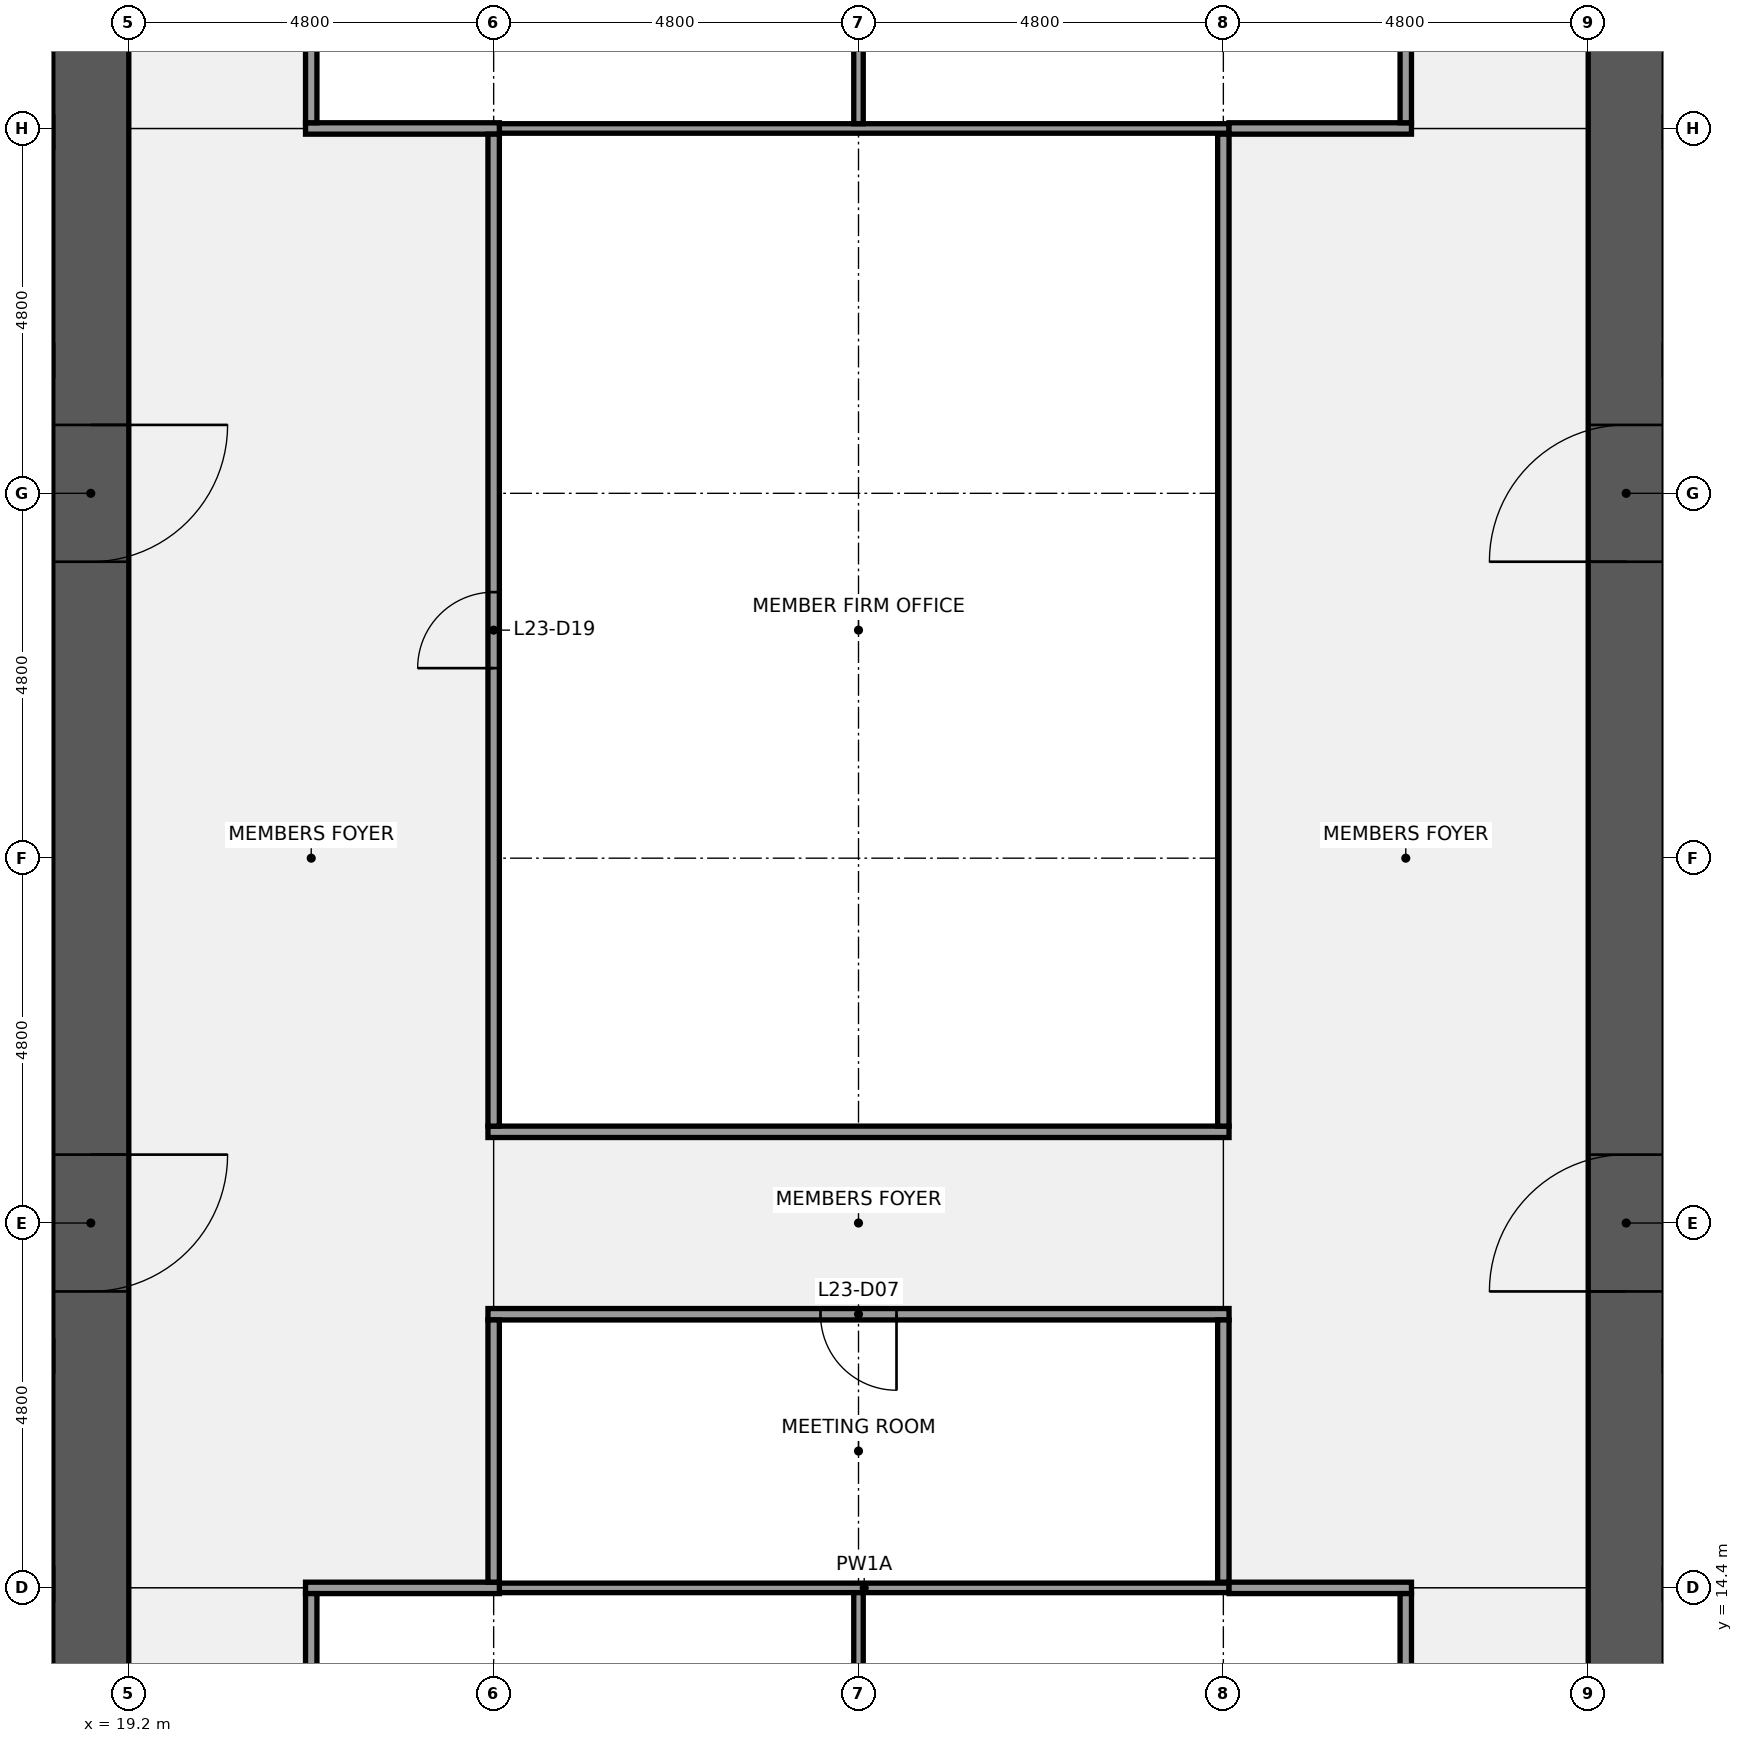
"""IFC4 building model, lengths in metres.
Left out: names, types, materials, properties, quantities, classifications, styles, units other than length and angle.
Written with IfcOpenShell. Run it as: python <this file> out.ifc"""

import sys

from ifc_helpers import new_model, si_unit, direction, frame, frame_2d, origin, place, context, subcontext, project, spatial, rectangle, extrude, element, fill, save


model = new_model("IFC4")
c1 = context("Model", 3, precision=1e-05, world=origin(), true_north=direction((0.0, 1.0)))
c2 = subcontext(c1, "Body", "Model", "MODEL_VIEW")
j1 = project(units=[si_unit("LENGTHUNIT", "METRE"), si_unit("PLANEANGLEUNIT", "RADIAN")], contexts=[c1])
p1 = place(None, origin())
s1 = spatial("IfcSite", under=j1, at=p1, CompositionType="ELEMENT")
p2 = place(p1, origin())
s2 = spatial("IfcBuilding", under=s1, at=p2, CompositionType="ELEMENT")
p3 = place(p2, frame((0.0, 0.0, 112.1)))
s3 = spatial("IfcBuildingStorey", under=s2, at=p3, CompositionType="ELEMENT", Elevation=112.1)
p4 = place(p3, frame((18.7, 38.4, 0.0), z_axis=(0.0, 0.0, 1.0), x_axis=(0.0, -1.0, 0.0)))
e1 = element("IfcWall", 1, at=p4, inside=s3, PredefinedType="SHEAR", context=c2, shape_type="SweptSolid", body=[
    extrude(rectangle(XDim=28.8, YDim=1.0, at=frame_2d((14.4, 0.0))), origin(), (0.0, 0.0, 1.0), 3.84),
])
p5 = place(p4, frame((18.3, 0.0, 0.0)))
e2 = element("IfcOpeningElement", 2, at=p5, cuts=e1, PredefinedType="OPENING", context=c2, shape_type="SweptSolid", body=[
    extrude(rectangle(XDim=1.8, YDim=2.1, at=frame_2d((0.9, 1.05))), frame((0.0, 0.51, 0.0), z_axis=(0.0, -1.0, 0.0), x_axis=(1.0, 0.0, 0.0)), (0.0, 0.0, 1.0), 1.02),
])
p6 = place(p4, frame((8.7, 0.0, 0.0)))
e3 = element("IfcOpeningElement", 3, at=p6, cuts=e1, PredefinedType="OPENING", context=c2, shape_type="SweptSolid", body=[
    extrude(rectangle(XDim=1.8, YDim=2.1, at=frame_2d((0.9, 1.05))), frame((0.0, 0.51, 0.0), z_axis=(0.0, -1.0, 0.0), x_axis=(1.0, 0.0, 0.0)), (0.0, 0.0, 1.0), 1.02),
])
p7 = place(p3, frame((1.0, 14.45, 0.0), z_axis=(0.0, 0.0, 1.0), x_axis=(1.0, 0.0, 0.0)))
e4 = element("IfcWall", 4, at=p7, inside=s3, PredefinedType="SHEAR", context=c2, shape_type="SweptSolid", body=[
    extrude(rectangle(XDim=17.2, YDim=0.4, at=frame_2d((8.6, 0.0))), origin(), (0.0, 0.0, 1.0), 3.84),
])
p8 = place(p3, frame((1.0, 17.45, 0.0), z_axis=(0.0, 0.0, 1.0), x_axis=(1.0, 0.0, 0.0)))
e5 = element("IfcWall", 5, at=p8, inside=s3, PredefinedType="SHEAR", context=c2, shape_type="SweptSolid", body=[
    extrude(rectangle(XDim=17.2, YDim=0.4, at=frame_2d((8.6, 0.0))), origin(), (0.0, 0.0, 1.0), 3.84),
])
p9 = place(p8, frame((1.663, 0.0, 0.0)))
e6 = element("IfcOpeningElement", 6, at=p9, cuts=e5, PredefinedType="OPENING", context=c2, shape_type="SweptSolid", body=[
    extrude(rectangle(XDim=1.0, YDim=2.1, at=frame_2d((0.5, 1.05))), frame((0.0, 0.21, 0.0), z_axis=(0.0, -1.0, 0.0), x_axis=(1.0, 0.0, 0.0)), (0.0, 0.0, 1.0), 0.42),
])
p10 = place(p8, frame((5.7, 0.0, 0.0)))
e7 = element("IfcOpeningElement", 7, at=p10, cuts=e5, PredefinedType="OPENING", context=c2, shape_type="SweptSolid", body=[
    extrude(rectangle(XDim=1.0, YDim=2.1, at=frame_2d((0.5, 1.05))), frame((0.0, 0.21, 0.0), z_axis=(0.0, -1.0, 0.0), x_axis=(1.0, 0.0, 0.0)), (0.0, 0.0, 1.0), 0.42),
])
p11 = place(p8, frame((9.0, 0.0, 0.0)))
e8 = element("IfcOpeningElement", 8, at=p11, cuts=e5, PredefinedType="OPENING", context=c2, shape_type="SweptSolid", body=[
    extrude(rectangle(XDim=1.0, YDim=2.1, at=frame_2d((0.5, 1.05))), frame((0.0, 0.21, 0.0), z_axis=(0.0, -1.0, 0.0), x_axis=(1.0, 0.0, 0.0)), (0.0, 0.0, 1.0), 0.42),
])
p12 = place(p8, frame((11.7, 0.0, 0.0)))
e9 = element("IfcOpeningElement", 9, at=p12, cuts=e5, PredefinedType="OPENING", context=c2, shape_type="SweptSolid", body=[
    extrude(rectangle(XDim=1.0, YDim=2.1, at=frame_2d((0.5, 1.05))), frame((0.0, 0.21, 0.0), z_axis=(0.0, -1.0, 0.0), x_axis=(1.0, 0.0, 0.0)), (0.0, 0.0, 1.0), 0.42),
])
p13 = place(p8, frame((14.837, 0.0, 0.0)))
e10 = element("IfcOpeningElement", 10, at=p13, cuts=e5, PredefinedType="OPENING", context=c2, shape_type="SweptSolid", body=[
    extrude(rectangle(XDim=1.0, YDim=2.1, at=frame_2d((0.5, 1.05))), frame((0.0, 0.21, 0.0), z_axis=(0.0, -1.0, 0.0), x_axis=(1.0, 0.0, 0.0)), (0.0, 0.0, 1.0), 0.42),
])
p14 = place(p3, frame((1.0, 30.55, 0.0), z_axis=(0.0, 0.0, 1.0), x_axis=(1.0, 0.0, 0.0)))
e11 = element("IfcWall", 11, at=p14, inside=s3, PredefinedType="SHEAR", context=c2, shape_type="SweptSolid", body=[
    extrude(rectangle(XDim=17.2, YDim=0.4, at=frame_2d((8.6, 0.0))), origin(), (0.0, 0.0, 1.0), 3.84),
])
p15 = place(p14, frame((0.762, 0.0, 0.0)))
e12 = element("IfcOpeningElement", 12, at=p15, cuts=e11, PredefinedType="OPENING", context=c2, shape_type="SweptSolid", body=[
    extrude(rectangle(XDim=1.0, YDim=2.1, at=frame_2d((0.5, 1.05))), frame((0.0, 0.21, 0.0), z_axis=(0.0, -1.0, 0.0), x_axis=(1.0, 0.0, 0.0)), (0.0, 0.0, 1.0), 0.42),
])
p16 = place(p14, frame((3.6, 0.0, 0.0)))
e13 = element("IfcOpeningElement", 13, at=p16, cuts=e11, PredefinedType="OPENING", context=c2, shape_type="SweptSolid", body=[
    extrude(rectangle(XDim=1.0, YDim=2.1, at=frame_2d((0.5, 1.05))), frame((0.0, 0.21, 0.0), z_axis=(0.0, -1.0, 0.0), x_axis=(1.0, 0.0, 0.0)), (0.0, 0.0, 1.0), 0.42),
])
p17 = place(p14, frame((6.6, 0.0, 0.0)))
e14 = element("IfcOpeningElement", 14, at=p17, cuts=e11, PredefinedType="OPENING", context=c2, shape_type="SweptSolid", body=[
    extrude(rectangle(XDim=1.0, YDim=2.1, at=frame_2d((0.5, 1.05))), frame((0.0, 0.21, 0.0), z_axis=(0.0, -1.0, 0.0), x_axis=(1.0, 0.0, 0.0)), (0.0, 0.0, 1.0), 0.42),
])
p18 = place(p14, frame((10.2, 0.0, 0.0)))
e15 = element("IfcOpeningElement", 15, at=p18, cuts=e11, PredefinedType="OPENING", context=c2, shape_type="SweptSolid", body=[
    extrude(rectangle(XDim=1.0, YDim=2.1, at=frame_2d((0.5, 1.05))), frame((0.0, 0.21, 0.0), z_axis=(0.0, -1.0, 0.0), x_axis=(1.0, 0.0, 0.0)), (0.0, 0.0, 1.0), 0.42),
])
p19 = place(p14, frame((14.538, 0.0, 0.0)))
e16 = element("IfcOpeningElement", 16, at=p19, cuts=e11, PredefinedType="OPENING", context=c2, shape_type="SweptSolid", body=[
    extrude(rectangle(XDim=1.0, YDim=2.1, at=frame_2d((0.5, 1.05))), frame((0.0, 0.21, 0.0), z_axis=(0.0, -1.0, 0.0), x_axis=(1.0, 0.0, 0.0)), (0.0, 0.0, 1.0), 0.42),
])
p20 = place(p3, frame((1.0, 33.55, 0.0), z_axis=(0.0, 0.0, 1.0), x_axis=(1.0, 0.0, 0.0)))
e17 = element("IfcWall", 17, at=p20, inside=s3, PredefinedType="SHEAR", context=c2, shape_type="SweptSolid", body=[
    extrude(rectangle(XDim=17.2, YDim=0.4, at=frame_2d((8.6, 0.0))), origin(), (0.0, 0.0, 1.0), 3.84),
])
p21 = place(p3, frame((38.9, 9.6, 0.0), z_axis=(0.0, 0.0, 1.0), x_axis=(0.0, 1.0, 0.0)))
e18 = element("IfcWall", 18, at=p21, inside=s3, PredefinedType="SHEAR", context=c2, shape_type="SweptSolid", body=[
    extrude(rectangle(XDim=28.8, YDim=1.0, at=frame_2d((14.4, 0.0))), origin(), (0.0, 0.0, 1.0), 3.84),
])
p22 = place(p21, frame((8.7, 0.0, 0.0)))
e19 = element("IfcOpeningElement", 19, at=p22, cuts=e18, PredefinedType="OPENING", context=c2, shape_type="SweptSolid", body=[
    extrude(rectangle(XDim=1.8, YDim=2.1, at=frame_2d((0.9, 1.05))), frame((0.0, 0.51, 0.0), z_axis=(0.0, -1.0, 0.0), x_axis=(1.0, 0.0, 0.0)), (0.0, 0.0, 1.0), 1.02),
])
p23 = place(p21, frame((18.3, 0.0, 0.0)))
e20 = element("IfcOpeningElement", 20, at=p23, cuts=e18, PredefinedType="OPENING", context=c2, shape_type="SweptSolid", body=[
    extrude(rectangle(XDim=1.8, YDim=2.1, at=frame_2d((0.9, 1.05))), frame((0.0, 0.51, 0.0), z_axis=(0.0, -1.0, 0.0), x_axis=(1.0, 0.0, 0.0)), (0.0, 0.0, 1.0), 1.02),
])
p24 = place(p3, frame((24.075, 14.4, 0.0), z_axis=(0.0, 0.0, 1.0), x_axis=(1.0, 0.0, 0.0)))
e21 = element("IfcWall", 21, at=p24, inside=s3, PredefinedType="PARTITIONING", context=c2, shape_type="SweptSolid", body=[
    extrude(rectangle(XDim=9.6, YDim=0.125, at=frame_2d((4.8, 0.0))), origin(), (0.0, 0.0, 1.0), 2.849),
])
p25 = place(p3, frame((21.525, 14.4, 0.0), z_axis=(0.0, 0.0, 1.0), x_axis=(1.0, 0.0, 0.0)))
e22 = element("IfcWall", 22, at=p25, inside=s3, PredefinedType="PARTITIONING", context=c2, shape_type="SweptSolid", body=[
    extrude(rectangle(XDim=2.55, YDim=0.15, at=frame_2d((1.275, 0.0))), origin(), (0.0, 0.0, 1.0), 2.849),
])
p26 = place(p3, frame((33.675, 14.4, 0.0), z_axis=(0.0, 0.0, 1.0), x_axis=(1.0, 0.0, 0.0)))
e23 = element("IfcWall", 23, at=p26, inside=s3, PredefinedType="PARTITIONING", context=c2, shape_type="SweptSolid", body=[
    extrude(rectangle(XDim=2.4, YDim=0.15, at=frame_2d((1.2, 0.0))), origin(), (0.0, 0.0, 1.0), 2.849),
])
p27 = place(p3, frame((23.925, 18.0, 0.0), z_axis=(0.0, 0.0, 1.0), x_axis=(1.0, 0.0, 0.0)))
e24 = element("IfcWall", 24, at=p27, inside=s3, PredefinedType="PARTITIONING", context=c2, shape_type="SweptSolid", body=[
    extrude(rectangle(XDim=9.75, YDim=0.15, at=frame_2d((4.875, 0.0))), origin(), (0.0, 0.0, 1.0), 2.849),
])
p28 = place(p27, frame((4.375, 0.0, 0.0)))
e25 = element("IfcOpeningElement", 25, at=p28, cuts=e24, PredefinedType="OPENING", context=c2, shape_type="SweptSolid", body=[
    extrude(rectangle(XDim=1.0, YDim=2.1, at=frame_2d((0.5, 1.05))), frame((0.0, 0.085, 0.0), z_axis=(0.0, -1.0, 0.0), x_axis=(1.0, 0.0, 0.0)), (0.0, 0.0, 1.0), 0.17),
])
p29 = place(p3, frame((23.925, 20.4, 0.0), z_axis=(0.0, 0.0, 1.0), x_axis=(1.0, 0.0, 0.0)))
e26 = element("IfcWall", 26, at=p29, inside=s3, PredefinedType="PARTITIONING", context=c2, shape_type="SweptSolid", body=[
    extrude(rectangle(XDim=9.75, YDim=0.15, at=frame_2d((4.875, 0.0))), origin(), (0.0, 0.0, 1.0), 2.849),
])
p30 = place(p3, frame((24.075, 33.6, 0.0), z_axis=(0.0, 0.0, 1.0), x_axis=(1.0, 0.0, 0.0)))
e27 = element("IfcWall", 27, at=p30, inside=s3, PredefinedType="PARTITIONING", context=c2, shape_type="SweptSolid", body=[
    extrude(rectangle(XDim=9.6, YDim=0.125, at=frame_2d((4.8, 0.0))), origin(), (0.0, 0.0, 1.0), 2.849),
])
p31 = place(p3, frame((21.525, 33.6, 0.0), z_axis=(0.0, 0.0, 1.0), x_axis=(1.0, 0.0, 0.0)))
e28 = element("IfcWall", 28, at=p31, inside=s3, PredefinedType="PARTITIONING", context=c2, shape_type="SweptSolid", body=[
    extrude(rectangle(XDim=2.55, YDim=0.15, at=frame_2d((1.275, 0.0))), origin(), (0.0, 0.0, 1.0), 2.849),
])
p32 = place(p3, frame((33.675, 33.6, 0.0), z_axis=(0.0, 0.0, 1.0), x_axis=(1.0, 0.0, 0.0)))
e29 = element("IfcWall", 29, at=p32, inside=s3, PredefinedType="PARTITIONING", context=c2, shape_type="SweptSolid", body=[
    extrude(rectangle(XDim=2.4, YDim=0.15, at=frame_2d((1.2, 0.0))), origin(), (0.0, 0.0, 1.0), 2.849),
])
for number, where, z_axis, x_axis in (
    (30, (21.6, 9.675, 0.0), (0.0, 0.0, 1.0), (0.0, 1.0, 0.0)),
    (31, (21.6, 33.675, 0.0), (0.0, 0.0, 1.0), (0.0, 1.0, 0.0)),
):
    element("IfcWall", number, at=place(p3, frame(where, z_axis=z_axis, x_axis=x_axis)), inside=s3, PredefinedType="PARTITIONING", context=c2, shape_type="SweptSolid", body=[
        extrude(rectangle(XDim=4.65, YDim=0.15, at=frame_2d((2.325, 0.0))), origin(), (0.0, 0.0, 1.0), 2.849),
    ])
p33 = place(p3, frame((24.0, 14.475, 0.0), z_axis=(0.0, 0.0, 1.0), x_axis=(0.0, 1.0, 0.0)))
e32 = element("IfcWall", 32, at=p33, inside=s3, PredefinedType="PARTITIONING", context=c2, shape_type="SweptSolid", body=[
    extrude(rectangle(XDim=3.45, YDim=0.15, at=frame_2d((1.725, 0.0))), origin(), (0.0, 0.0, 1.0), 2.849),
])
p34 = place(p3, frame((24.0, 20.475, 0.0), z_axis=(0.0, 0.0, 1.0), x_axis=(0.0, 1.0, 0.0)))
e33 = element("IfcWall", 33, at=p34, inside=s3, PredefinedType="PARTITIONING", context=c2, shape_type="SweptSolid", body=[
    extrude(rectangle(XDim=13.05, YDim=0.15, at=frame_2d((6.525, 0.0))), origin(), (0.0, 0.0, 1.0), 2.849),
])
p35 = place(p34, frame((6.025, 0.0, 0.0)))
e34 = element("IfcOpeningElement", 34, at=p35, cuts=e33, PredefinedType="OPENING", context=c2, shape_type="SweptSolid", body=[
    extrude(rectangle(XDim=1.0, YDim=2.1, at=frame_2d((0.5, 1.05))), frame((0.0, 0.085, 0.0), z_axis=(0.0, -1.0, 0.0), x_axis=(1.0, 0.0, 0.0)), (0.0, 0.0, 1.0), 0.17),
])
for number, where, z_axis, x_axis in (
    (35, (28.8, 9.675, 0.0), (0.0, 0.0, 1.0), (0.0, 1.0, 0.0)),
    (36, (28.8, 33.663, 0.0), (0.0, 0.0, 1.0), (0.0, 1.0, 0.0)),
):
    element("IfcWall", number, at=place(p3, frame(where, z_axis=z_axis, x_axis=x_axis)), inside=s3, PredefinedType="PARTITIONING", context=c2, shape_type="SweptSolid", body=[
        extrude(rectangle(XDim=4.662, YDim=0.125, at=frame_2d((2.331, 0.0))), origin(), (0.0, 0.0, 1.0), 2.849),
    ])
p36 = place(p3, frame((33.6, 14.475, 0.0), z_axis=(0.0, 0.0, 1.0), x_axis=(0.0, 1.0, 0.0)))
e37 = element("IfcWall", 37, at=p36, inside=s3, PredefinedType="PARTITIONING", context=c2, shape_type="SweptSolid", body=[
    extrude(rectangle(XDim=3.45, YDim=0.15, at=frame_2d((1.725, 0.0))), origin(), (0.0, 0.0, 1.0), 2.849),
])
p37 = place(p3, frame((33.6, 20.475, 0.0), z_axis=(0.0, 0.0, 1.0), x_axis=(0.0, 1.0, 0.0)))
e38 = element("IfcWall", 38, at=p37, inside=s3, PredefinedType="PARTITIONING", context=c2, shape_type="SweptSolid", body=[
    extrude(rectangle(XDim=13.05, YDim=0.15, at=frame_2d((6.525, 0.0))), origin(), (0.0, 0.0, 1.0), 2.849),
])
for number, where, z_axis, x_axis in (
    (39, (36.0, 9.675, 0.0), (0.0, 0.0, 1.0), (0.0, 1.0, 0.0)),
    (40, (36.0, 33.675, 0.0), (0.0, 0.0, 1.0), (0.0, 1.0, 0.0)),
):
    element("IfcWall", number, at=place(p3, frame(where, z_axis=z_axis, x_axis=x_axis)), inside=s3, PredefinedType="PARTITIONING", context=c2, shape_type="SweptSolid", body=[
        extrude(rectangle(XDim=4.65, YDim=0.15, at=frame_2d((2.325, 0.0))), origin(), (0.0, 0.0, 1.0), 2.849),
    ])
p38 = place(p5, origin())
e41 = element("IfcDoor", 41, at=p38, inside=s3, OperationType="DOUBLE_DOOR_SINGLE_SWING", PredefinedType="DOOR", context=c2, shape_type="SweptSolid", body=[
    extrude(rectangle(XDim=1.8, YDim=2.1, at=frame_2d((0.9, 1.05))), frame((0.0, 0.025, 0.0), z_axis=(0.0, -1.0, 0.0), x_axis=(1.0, 0.0, 0.0)), (0.0, 0.0, 1.0), 0.05),
])
fill(e2, e41)
p39 = place(p6, origin())
e42 = element("IfcDoor", 42, at=p39, inside=s3, OperationType="DOUBLE_DOOR_SINGLE_SWING", PredefinedType="DOOR", context=c2, shape_type="SweptSolid", body=[
    extrude(rectangle(XDim=1.8, YDim=2.1, at=frame_2d((0.9, 1.05))), frame((0.0, 0.025, 0.0), z_axis=(0.0, -1.0, 0.0), x_axis=(1.0, 0.0, 0.0)), (0.0, 0.0, 1.0), 0.05),
])
fill(e3, e42)
p40 = place(p22, origin())
e43 = element("IfcDoor", 43, at=p40, inside=s3, OperationType="DOUBLE_DOOR_SINGLE_SWING", PredefinedType="DOOR", context=c2, shape_type="SweptSolid", body=[
    extrude(rectangle(XDim=1.8, YDim=2.1, at=frame_2d((0.9, 1.05))), frame((0.0, 0.025, 0.0), z_axis=(0.0, -1.0, 0.0), x_axis=(1.0, 0.0, 0.0)), (0.0, 0.0, 1.0), 0.05),
])
fill(e19, e43)
p41 = place(p23, origin())
e44 = element("IfcDoor", 44, at=p41, inside=s3, OperationType="DOUBLE_DOOR_SINGLE_SWING", PredefinedType="DOOR", context=c2, shape_type="SweptSolid", body=[
    extrude(rectangle(XDim=1.8, YDim=2.1, at=frame_2d((0.9, 1.05))), frame((0.0, 0.025, 0.0), z_axis=(0.0, -1.0, 0.0), x_axis=(1.0, 0.0, 0.0)), (0.0, 0.0, 1.0), 0.05),
])
fill(e20, e44)
p42 = place(p28, origin())
e45 = element("IfcDoor", 45, at=p42, inside=s3, OperationType="SINGLE_SWING_RIGHT", PredefinedType="DOOR", context=c2, shape_type="SweptSolid", body=[
    extrude(rectangle(XDim=1.0, YDim=2.1, at=frame_2d((0.5, 1.05))), frame((0.0, 0.025, 0.0), z_axis=(0.0, -1.0, 0.0), x_axis=(1.0, 0.0, 0.0)), (0.0, 0.0, 1.0), 0.05),
])
fill(e25, e45)
p43 = place(p35, origin())
e46 = element("IfcDoor", 46, at=p43, inside=s3, OperationType="SINGLE_SWING_LEFT", PredefinedType="DOOR", context=c2, shape_type="SweptSolid", body=[
    extrude(rectangle(XDim=1.0, YDim=2.1, at=frame_2d((0.5, 1.05))), frame((0.0, 0.025, 0.0), z_axis=(0.0, -1.0, 0.0), x_axis=(1.0, 0.0, 0.0)), (0.0, 0.0, 1.0), 0.05),
])
fill(e34, e46)
save(model, sys.argv[1])
